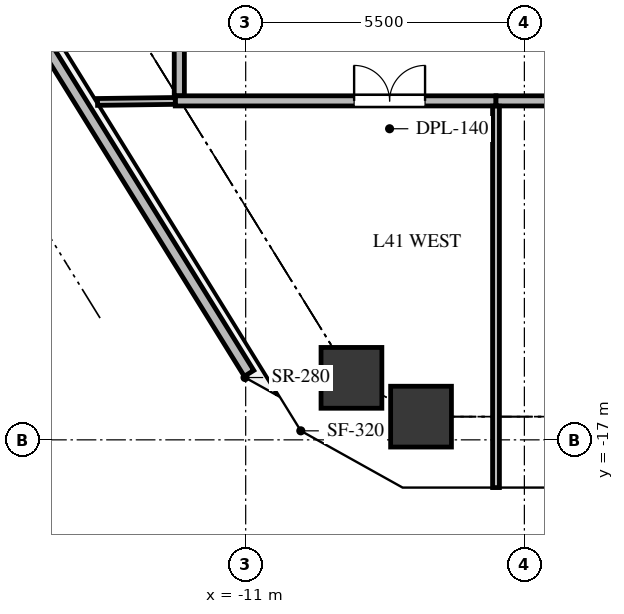
"""IFC4 building model, lengths in metres.
Left out: names, types, materials, properties, quantities, classifications, styles, units other than length and angle.
Written with IfcOpenShell. Run it as: python <this file> out.ifc"""

import sys

from ifc_helpers import new_model, si_unit, direction, frame, frame_2d, origin, origin_2d, place, context, subcontext, project, spatial, rectangle, extrude, source, transform, mapped, element, fill, save


model = new_model("IFC4")
c1 = context("Model", 3, precision=1e-05, world=origin(), true_north=direction((0.0, 1.0)))
c2 = subcontext(c1, "Body", "Model", "MODEL_VIEW")
j1 = project(units=[si_unit("LENGTHUNIT", "METRE"), si_unit("PLANEANGLEUNIT", "RADIAN")], contexts=[c1])
p1 = place(None, origin())
s1 = spatial("IfcSite", under=j1, at=p1, CompositionType="ELEMENT")
p2 = place(p1, origin())
s2 = spatial("IfcBuilding", under=s1, at=p2, CompositionType="ELEMENT")
p3 = place(p2, frame((0.0, 0.0, 150.3)))
s3 = spatial("IfcBuildingStorey", under=s2, at=p3, CompositionType="ELEMENT", Elevation=150.3)
m1 = source(origin(), c2, "Body", "SweptSolid", [
    extrude(rectangle(XDim=1.2, YDim=1.2, at=origin_2d()), origin(), (0.0, 0.0, 1.0), 4.8),
])
for number, where, z_axis, x_axis in (
    (1, (-8.913, -15.776, -0.32), (0.0, 0.0, 1.0), (1.0, 0.0, 0.0)),
    (2, (-7.54, -16.542, -0.32), (0.0, 0.0, 1.0), (1.0, 0.0, 0.0)),
):
    element("IfcColumn", number, at=place(p3, frame(where, z_axis=z_axis, x_axis=x_axis)), inside=s3, PredefinedType="COLUMN", context=c2, shape_type="MappedRepresentation", body=[
        mapped(m1, transform((0.0, 0.0, 0.0), x_axis=(1.0, 0.0, 0.0), y_axis=(0.0, 1.0, 0.0), z_axis=(0.0, 0.0, 1.0), scale=1.0)),
    ])
p4 = place(p3, frame((-10.934, -15.688, 0.0), z_axis=(0.0, 0.0, 1.0), x_axis=(-0.527101579679, 0.849802285652, 0.0)))
e3 = element("IfcWall", 3, at=p4, inside=s3, PredefinedType="PARAPET", context=c2, shape_type="SweptSolid", body=[
    extrude(rectangle(XDim=19.866, YDim=0.22, at=frame_2d((9.933, 0.0))), origin(), (0.0, 0.0, 1.0), 1.2),
])
p5 = place(p3, frame((-12.39, -10.31, 0.0), z_axis=(0.0, 0.0, 1.0), x_axis=(1.0, 0.0, 0.0)))
e4 = element("IfcWall", 4, at=p5, inside=s3, PredefinedType="SOLIDWALL", context=c2, shape_type="SweptSolid", body=[
    extrude(rectangle(XDim=6.33, YDim=0.2, at=frame_2d((3.165, 0.0))), origin(), (0.0, 0.0, 1.0), 3.819),
])
p6 = place(p5, frame((3.53, 0.0, 0.0)))
e5 = element("IfcOpeningElement", 5, at=p6, cuts=e4, PredefinedType="OPENING", context=c2, shape_type="SweptSolid", body=[
    extrude(rectangle(XDim=1.4, YDim=2.15, at=frame_2d((0.7, 1.075))), frame((0.0, 0.11, 0.0), z_axis=(0.0, -1.0, 0.0), x_axis=(1.0, 0.0, 0.0)), (0.0, 0.0, 1.0), 0.22),
])
p7 = place(p3, frame((-6.06, -10.31, 0.0), z_axis=(0.0, 0.0, 1.0), x_axis=(1.0, 0.0, 0.0)))
e6 = element("IfcWall", 6, at=p7, inside=s3, PredefinedType="SOLIDWALL", context=c2, shape_type="SweptSolid", body=[
    extrude(rectangle(XDim=6.1, YDim=0.2, at=frame_2d((3.05, 0.0))), origin(), (0.0, 0.0, 1.0), 3.662),
])
p8 = place(p7, frame((2.35, 0.0, 0.0)))
e7 = element("IfcOpeningElement", 7, at=p8, cuts=e6, PredefinedType="OPENING", context=c2, shape_type="SweptSolid", body=[
    extrude(rectangle(XDim=1.4, YDim=2.15, at=frame_2d((0.7, 1.075))), frame((0.0, 0.11, 0.0), z_axis=(0.0, -1.0, 0.0), x_axis=(1.0, 0.0, 0.0)), (0.0, 0.0, 1.0), 0.22),
])
p9 = place(p3, frame((-12.31, -3.41, 0.0), z_axis=(0.0, 0.0, 1.0), x_axis=(0.0, -1.0, 0.0)))
e8 = element("IfcWall", 8, at=p9, inside=s3, PredefinedType="SOLIDWALL", context=c2, shape_type="SweptSolid", body=[
    extrude(rectangle(XDim=6.796, YDim=0.2, at=frame_2d((3.398, 0.0))), origin(), (0.0, 0.0, 1.0), 3.819),
])
p10 = place(p9, frame((0.35, 0.0, 0.0)))
e9 = element("IfcOpeningElement", 9, at=p10, cuts=e8, PredefinedType="OPENING", context=c2, shape_type="SweptSolid", body=[
    extrude(rectangle(XDim=0.9, YDim=2.05, at=frame_2d((0.45, 1.025))), frame((0.0, 0.11, 0.0), z_axis=(0.0, -1.0, 0.0), x_axis=(1.0, 0.0, 0.0)), (0.0, 0.0, 1.0), 0.22),
])
p11 = place(p3, frame((-6.06, -10.414, 0.0), z_axis=(0.0, 0.0, 1.0), x_axis=(0.0, -1.0, 0.0)))
e10 = element("IfcWall", 10, at=p11, inside=s3, PredefinedType="PARTITIONING", context=c2, shape_type="SweptSolid", body=[
    extrude(rectangle(XDim=7.528, YDim=0.135, at=frame_2d((3.764, 0.0))), origin(), (0.0, 0.0, 1.0), 3.662),
])
p12 = place(p3, frame((-13.924, -10.331, 0.0), z_axis=(0.0, 0.0, 1.0), x_axis=(0.999914818291, 0.01305205589, 0.0)))
e11 = element("IfcWall", 11, at=p12, inside=s3, PredefinedType="PARTITIONING", context=c2, shape_type="SweptSolid", body=[
    extrude(rectangle(XDim=1.534, YDim=0.135, at=frame_2d((0.767, 0.0))), origin(), (0.0, 0.0, 1.0), 3.819),
])
m2 = source(origin(), c2, "Body", "SweptSolid", [
    extrude(rectangle(XDim=1.4, YDim=2.15, at=frame_2d((0.7, 1.075))), frame((0.0, 0.025, 0.0), z_axis=(0.0, -1.0, 0.0), x_axis=(1.0, 0.0, 0.0)), (0.0, 0.0, 1.0), 0.05),
])
p13 = place(p6, origin())
e12 = element("IfcDoor", 12, at=p13, inside=s3, OperationType="DOUBLE_DOOR_SINGLE_SWING", PredefinedType="DOOR", context=c2, shape_type="MappedRepresentation", body=[
    mapped(m2, transform((0.0, 0.0, 0.0), x_axis=(1.0, 0.0, 0.0), y_axis=(0.0, 1.0, 0.0), z_axis=(0.0, 0.0, 1.0), scale=1.0)),
])
fill(e5, e12)
save(model, sys.argv[1])
